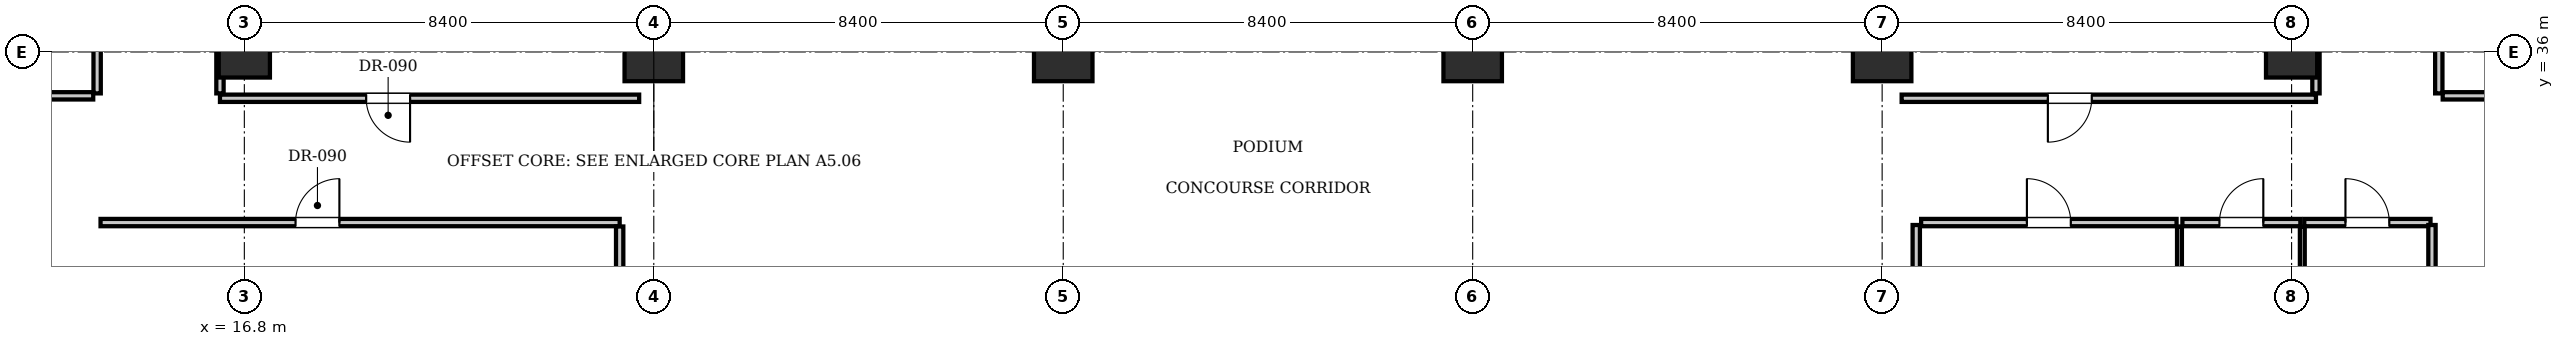
"""IFC4 building model, lengths in metres.
Left out: names, types, materials, properties, quantities, classifications, styles, units other than length and angle.
Written with IfcOpenShell. Run it as: python <this file> out.ifc"""

import sys

from ifc_helpers import new_model, si_unit, direction, frame, frame_2d, origin, origin_2d, place, context, subcontext, project, spatial, rectangle, extrude, element, fill, save


model = new_model("IFC4")
c1 = context("Model", 3, precision=1e-05, world=origin(), true_north=direction((0.0, 1.0)))
c2 = subcontext(c1, "Body", "Model", "MODEL_VIEW")
j1 = project(units=[si_unit("LENGTHUNIT", "METRE"), si_unit("PLANEANGLEUNIT", "RADIAN")], contexts=[c1])
p1 = place(None, origin())
s1 = spatial("IfcSite", under=j1, at=p1, CompositionType="ELEMENT")
p2 = place(p1, origin())
s2 = spatial("IfcBuilding", under=s1, at=p2, CompositionType="ELEMENT")
p3 = place(p2, frame((0.0, 0.0, 16.45)))
s3 = spatial("IfcBuildingStorey", under=s2, at=p3, CompositionType="ELEMENT", Elevation=16.45)
for number, where, z_axis, x_axis in (
    (1, (25.2, 36.0, 0.0), (0.0, 0.0, 1.0), (1.0, 0.0, 0.0)),
    (2, (33.6, 36.0, 0.0), (0.0, 0.0, 1.0), (1.0, 0.0, 0.0)),
    (3, (42.0, 36.0, 0.0), (0.0, 0.0, 1.0), (1.0, 0.0, 0.0)),
    (4, (50.4, 36.0, 0.0), (0.0, 0.0, 1.0), (1.0, 0.0, 0.0)),
):
    element("IfcColumn", number, at=place(p3, frame(where, z_axis=z_axis, x_axis=x_axis)), inside=s3, PredefinedType="COLUMN", context=c2, shape_type="SweptSolid", body=[
        extrude(rectangle(XDim=1.2, YDim=1.2, at=origin_2d()), origin(), (0.0, 0.0, 1.0), 4.9),
    ])
for number, where, z_axis, x_axis in (
    (5, (16.8, 36.0, 0.0), (0.0, 0.0, 1.0), (1.0, 0.0, 0.0)),
    (6, (58.8, 36.0, 0.0), (0.0, 0.0, 1.0), (1.0, 0.0, 0.0)),
):
    element("IfcColumn", number, at=place(p3, frame(where, z_axis=z_axis, x_axis=x_axis)), inside=s3, PredefinedType="COLUMN", context=c2, shape_type="SweptSolid", body=[
        extrude(rectangle(XDim=1.05, YDim=1.05, at=origin_2d()), origin(), (0.0, 0.0, 1.0), 4.9),
    ])
p4 = place(p3, frame((13.85, 32.5, 0.0), z_axis=(0.0, 0.0, 1.0), x_axis=(1.0, 0.0, 0.0)))
e7 = element("IfcWall", 7, at=p4, inside=s3, PredefinedType="PARTITIONING", context=c2, shape_type="SweptSolid", body=[
    extrude(rectangle(XDim=10.65, YDim=0.15, at=frame_2d((5.325, 0.0))), origin(), (0.0, 0.0, 1.0), 4.62),
])
p5 = place(p4, frame((4.0, 0.0, 0.0)))
e8 = element("IfcOpeningElement", 8, at=p5, cuts=e7, PredefinedType="OPENING", context=c2, shape_type="SweptSolid", body=[
    extrude(rectangle(XDim=0.9, YDim=2.1, at=frame_2d((0.45, 1.05))), frame((0.0, 0.085, 0.0), z_axis=(0.0, -1.0, 0.0), x_axis=(1.0, 0.0, 0.0)), (0.0, 0.0, 1.0), 0.17),
])
p6 = place(p3, frame((24.5, 15.1, 0.0), z_axis=(0.0, 0.0, 1.0), x_axis=(0.0, 1.0, 0.0)))
e9 = element("IfcWall", 9, at=p6, inside=s3, PredefinedType="PARTITIONING", context=c2, shape_type="SweptSolid", body=[
    extrude(rectangle(XDim=17.32, YDim=0.15, at=frame_2d((8.66, 0.0))), origin(), (0.0, 0.0, 1.0), 4.62),
])
p7 = place(p3, frame((16.3, 35.05, 0.0), z_axis=(0.0, 0.0, 1.0), x_axis=(1.0, 0.0, 0.0)))
e10 = element("IfcWall", 10, at=p7, inside=s3, PredefinedType="PARTITIONING", context=c2, shape_type="SweptSolid", body=[
    extrude(rectangle(XDim=8.6, YDim=0.15, at=frame_2d((4.3, 0.0))), origin(), (0.0, 0.0, 1.0), 4.62),
])
p8 = place(p7, frame((3.0, 0.0, 0.0)))
e11 = element("IfcOpeningElement", 11, at=p8, cuts=e10, PredefinedType="OPENING", context=c2, shape_type="SweptSolid", body=[
    extrude(rectangle(XDim=0.9, YDim=2.1, at=frame_2d((0.45, 1.05))), frame((0.0, 0.085, 0.0), z_axis=(0.0, -1.0, 0.0), x_axis=(1.0, 0.0, 0.0)), (0.0, 0.0, 1.0), 0.17),
])
p9 = place(p3, frame((16.3, 35.15, 0.0), z_axis=(0.0, 0.0, 1.0), x_axis=(0.0, 1.0, 0.0)))
e12 = element("IfcWall", 12, at=p9, inside=s3, PredefinedType="PARTITIONING", context=c2, shape_type="SweptSolid", body=[
    extrude(rectangle(XDim=18.6, YDim=0.15, at=frame_2d((9.3, 0.0))), origin(), (0.0, 0.0, 1.0), 4.62),
])
p10 = place(p3, frame((13.78, 35.15, 0.0), z_axis=(0.0, 0.0, 1.0), x_axis=(0.0, 1.0, 0.0)))
e13 = element("IfcWall", 13, at=p10, inside=s3, PredefinedType="PARTITIONING", context=c2, shape_type="SweptSolid", body=[
    extrude(rectangle(XDim=9.7, YDim=0.15, at=frame_2d((4.85, 0.0))), origin(), (0.0, 0.0, 1.0), 4.62),
])
p11 = place(p10, frame((3.0, 0.0, 0.0)))
e14 = element("IfcOpeningElement", 14, at=p11, cuts=e13, PredefinedType="OPENING", context=c2, shape_type="SweptSolid", body=[
    extrude(rectangle(XDim=0.9, YDim=2.1, at=frame_2d((0.45, 1.05))), frame((0.0, 0.085, 0.0), z_axis=(0.0, -1.0, 0.0), x_axis=(1.0, 0.0, 0.0)), (0.0, 0.0, 1.0), 0.17),
])
p12 = place(p3, frame((4.35, 35.1, 0.0), z_axis=(0.0, 0.0, 1.0), x_axis=(1.0, 0.0, 0.0)))
e15 = element("IfcWall", 15, at=p12, inside=s3, PredefinedType="PARTITIONING", context=c2, shape_type="SweptSolid", body=[
    extrude(rectangle(XDim=9.35, YDim=0.15, at=frame_2d((4.675, 0.0))), origin(), (0.0, 0.0, 1.0), 4.62),
])
p13 = place(p3, frame((51.2, 32.5, 0.0), z_axis=(0.0, 0.0, 1.0), x_axis=(1.0, 0.0, 0.0)))
e16 = element("IfcWall", 16, at=p13, inside=s3, PredefinedType="PARTITIONING", context=c2, shape_type="SweptSolid", body=[
    extrude(rectangle(XDim=5.24, YDim=0.15, at=frame_2d((2.62, 0.0))), origin(), (0.0, 0.0, 1.0), 4.62),
])
p14 = place(p13, frame((2.17, 0.0, 0.0)))
e17 = element("IfcOpeningElement", 17, at=p14, cuts=e16, PredefinedType="OPENING", context=c2, shape_type="SweptSolid", body=[
    extrude(rectangle(XDim=0.9, YDim=2.1, at=frame_2d((0.45, 1.05))), frame((0.0, 0.085, 0.0), z_axis=(0.0, -1.0, 0.0), x_axis=(1.0, 0.0, 0.0)), (0.0, 0.0, 1.0), 0.17),
])
p15 = place(p3, frame((56.56, 32.5, 0.0), z_axis=(0.0, 0.0, 1.0), x_axis=(1.0, 0.0, 0.0)))
e18 = element("IfcWall", 18, at=p15, inside=s3, PredefinedType="PARTITIONING", context=c2, shape_type="SweptSolid", body=[
    extrude(rectangle(XDim=2.42, YDim=0.15, at=frame_2d((1.21, 0.0))), origin(), (0.0, 0.0, 1.0), 4.62),
])
p16 = place(p15, frame((0.76, 0.0, 0.0)))
e19 = element("IfcOpeningElement", 19, at=p16, cuts=e18, PredefinedType="OPENING", context=c2, shape_type="SweptSolid", body=[
    extrude(rectangle(XDim=0.9, YDim=2.1, at=frame_2d((0.45, 1.05))), frame((0.0, 0.085, 0.0), z_axis=(0.0, -1.0, 0.0), x_axis=(1.0, 0.0, 0.0)), (0.0, 0.0, 1.0), 0.17),
])
p17 = place(p3, frame((59.06, 32.5, 0.0), z_axis=(0.0, 0.0, 1.0), x_axis=(1.0, 0.0, 0.0)))
e20 = element("IfcWall", 20, at=p17, inside=s3, PredefinedType="PARTITIONING", context=c2, shape_type="SweptSolid", body=[
    extrude(rectangle(XDim=2.59, YDim=0.15, at=frame_2d((1.295, 0.0))), origin(), (0.0, 0.0, 1.0), 4.62),
])
p18 = place(p17, frame((0.845, 0.0, 0.0)))
e21 = element("IfcOpeningElement", 21, at=p18, cuts=e20, PredefinedType="OPENING", context=c2, shape_type="SweptSolid", body=[
    extrude(rectangle(XDim=0.9, YDim=2.1, at=frame_2d((0.45, 1.05))), frame((0.0, 0.085, 0.0), z_axis=(0.0, -1.0, 0.0), x_axis=(1.0, 0.0, 0.0)), (0.0, 0.0, 1.0), 0.17),
])
for number, where, z_axis, x_axis in (
    (22, (51.1, 26.18, 0.0), (0.0, 0.0, 1.0), (0.0, 1.0, 0.0)),
    (23, (61.68, 26.18, 0.0), (0.0, 0.0, 1.0), (0.0, 1.0, 0.0)),
):
    element("IfcWall", number, at=place(p3, frame(where, z_axis=z_axis, x_axis=x_axis)), inside=s3, PredefinedType="PARTITIONING", context=c2, shape_type="SweptSolid", body=[
        extrude(rectangle(XDim=6.27, YDim=0.15, at=frame_2d((3.135, 0.0))), origin(), (0.0, 0.0, 1.0), 4.62),
    ])
for number, where, z_axis, x_axis in (
    (24, (56.5, 26.18, 0.0), (0.0, 0.0, 1.0), (0.0, 1.0, 0.0)),
    (25, (59.02, 26.18, 0.0), (0.0, 0.0, 1.0), (0.0, 1.0, 0.0)),
):
    element("IfcWall", number, at=place(p3, frame(where, z_axis=z_axis, x_axis=x_axis)), inside=s3, PredefinedType="PARTITIONING", context=c2, shape_type="SweptSolid", body=[
        extrude(rectangle(XDim=6.24, YDim=0.1, at=frame_2d((3.12, 0.0))), origin(), (0.0, 0.0, 1.0), 4.62),
    ])
p19 = place(p3, frame((50.8, 35.05, 0.0), z_axis=(0.0, 0.0, 1.0), x_axis=(1.0, 0.0, 0.0)))
e26 = element("IfcWall", 26, at=p19, inside=s3, PredefinedType="PARTITIONING", context=c2, shape_type="SweptSolid", body=[
    extrude(rectangle(XDim=8.5, YDim=0.15, at=frame_2d((4.25, 0.0))), origin(), (0.0, 0.0, 1.0), 4.62),
])
p20 = place(p19, frame((3.0, 0.0, 0.0)))
e27 = element("IfcOpeningElement", 27, at=p20, cuts=e26, PredefinedType="OPENING", context=c2, shape_type="SweptSolid", body=[
    extrude(rectangle(XDim=0.9, YDim=2.1, at=frame_2d((0.45, 1.05))), frame((0.0, 0.085, 0.0), z_axis=(0.0, -1.0, 0.0), x_axis=(1.0, 0.0, 0.0)), (0.0, 0.0, 1.0), 0.17),
])
p21 = place(p3, frame((59.3, 35.15, 0.0), z_axis=(0.0, 0.0, 1.0), x_axis=(0.0, 1.0, 0.0)))
e28 = element("IfcWall", 28, at=p21, inside=s3, PredefinedType="PARTITIONING", context=c2, shape_type="SweptSolid", body=[
    extrude(rectangle(XDim=18.6, YDim=0.15, at=frame_2d((9.3, 0.0))), origin(), (0.0, 0.0, 1.0), 4.62),
])
p22 = place(p3, frame((61.82, 35.15, 0.0), z_axis=(0.0, 0.0, 1.0), x_axis=(0.0, 1.0, 0.0)))
e29 = element("IfcWall", 29, at=p22, inside=s3, PredefinedType="PARTITIONING", context=c2, shape_type="SweptSolid", body=[
    extrude(rectangle(XDim=9.7, YDim=0.15, at=frame_2d((4.85, 0.0))), origin(), (0.0, 0.0, 1.0), 4.62),
])
p23 = place(p22, frame((3.0, 0.0, 0.0)))
e30 = element("IfcOpeningElement", 30, at=p23, cuts=e29, PredefinedType="OPENING", context=c2, shape_type="SweptSolid", body=[
    extrude(rectangle(XDim=0.9, YDim=2.1, at=frame_2d((0.45, 1.05))), frame((0.0, 0.085, 0.0), z_axis=(0.0, -1.0, 0.0), x_axis=(1.0, 0.0, 0.0)), (0.0, 0.0, 1.0), 0.17),
])
p24 = place(p3, frame((61.9, 35.1, 0.0), z_axis=(0.0, 0.0, 1.0), x_axis=(1.0, 0.0, 0.0)))
e31 = element("IfcWall", 31, at=p24, inside=s3, PredefinedType="PARTITIONING", context=c2, shape_type="SweptSolid", body=[
    extrude(rectangle(XDim=9.35, YDim=0.15, at=frame_2d((4.675, 0.0))), origin(), (0.0, 0.0, 1.0), 4.62),
])
p25 = place(p5, origin())
e32 = element("IfcDoor", 32, at=p25, inside=s3, OperationType="SINGLE_SWING_RIGHT", PredefinedType="DOOR", context=c2, shape_type="SweptSolid", body=[
    extrude(rectangle(XDim=0.9, YDim=2.1, at=frame_2d((0.45, 1.05))), frame((0.0, 0.025, 0.0), z_axis=(0.0, -1.0, 0.0), x_axis=(1.0, 0.0, 0.0)), (0.0, 0.0, 1.0), 0.05),
])
fill(e8, e32)
p26 = place(p8, frame((0.9, 0.0, 0.0), z_axis=(0.0, 0.0, 1.0), x_axis=(-1.0, 0.0, 0.0)))
e33 = element("IfcDoor", 33, at=p26, inside=s3, OperationType="SINGLE_SWING_LEFT", PredefinedType="DOOR", context=c2, shape_type="SweptSolid", body=[
    extrude(rectangle(XDim=0.9, YDim=2.1, at=frame_2d((0.45, 1.05))), frame((0.0, 0.025, 0.0), z_axis=(0.0, -1.0, 0.0), x_axis=(1.0, 0.0, 0.0)), (0.0, 0.0, 1.0), 0.05),
])
fill(e11, e33)
p27 = place(p14, origin())
e34 = element("IfcDoor", 34, at=p27, inside=s3, OperationType="SINGLE_SWING_LEFT", PredefinedType="DOOR", context=c2, shape_type="SweptSolid", body=[
    extrude(rectangle(XDim=0.9, YDim=2.1, at=frame_2d((0.45, 1.05))), frame((0.0, 0.025, 0.0), z_axis=(0.0, -1.0, 0.0), x_axis=(1.0, 0.0, 0.0)), (0.0, 0.0, 1.0), 0.05),
])
fill(e17, e34)
p28 = place(p16, origin())
e35 = element("IfcDoor", 35, at=p28, inside=s3, OperationType="SINGLE_SWING_RIGHT", PredefinedType="DOOR", context=c2, shape_type="SweptSolid", body=[
    extrude(rectangle(XDim=0.9, YDim=2.1, at=frame_2d((0.45, 1.05))), frame((0.0, 0.025, 0.0), z_axis=(0.0, -1.0, 0.0), x_axis=(1.0, 0.0, 0.0)), (0.0, 0.0, 1.0), 0.05),
])
fill(e19, e35)
p29 = place(p18, origin())
e36 = element("IfcDoor", 36, at=p29, inside=s3, OperationType="SINGLE_SWING_LEFT", PredefinedType="DOOR", context=c2, shape_type="SweptSolid", body=[
    extrude(rectangle(XDim=0.9, YDim=2.1, at=frame_2d((0.45, 1.05))), frame((0.0, 0.025, 0.0), z_axis=(0.0, -1.0, 0.0), x_axis=(1.0, 0.0, 0.0)), (0.0, 0.0, 1.0), 0.05),
])
fill(e21, e36)
p30 = place(p20, frame((0.9, 0.0, 0.0), z_axis=(0.0, 0.0, 1.0), x_axis=(-1.0, 0.0, 0.0)))
e37 = element("IfcDoor", 37, at=p30, inside=s3, OperationType="SINGLE_SWING_RIGHT", PredefinedType="DOOR", context=c2, shape_type="SweptSolid", body=[
    extrude(rectangle(XDim=0.9, YDim=2.1, at=frame_2d((0.45, 1.05))), frame((0.0, 0.025, 0.0), z_axis=(0.0, -1.0, 0.0), x_axis=(1.0, 0.0, 0.0)), (0.0, 0.0, 1.0), 0.05),
])
fill(e27, e37)
save(model, sys.argv[1])
